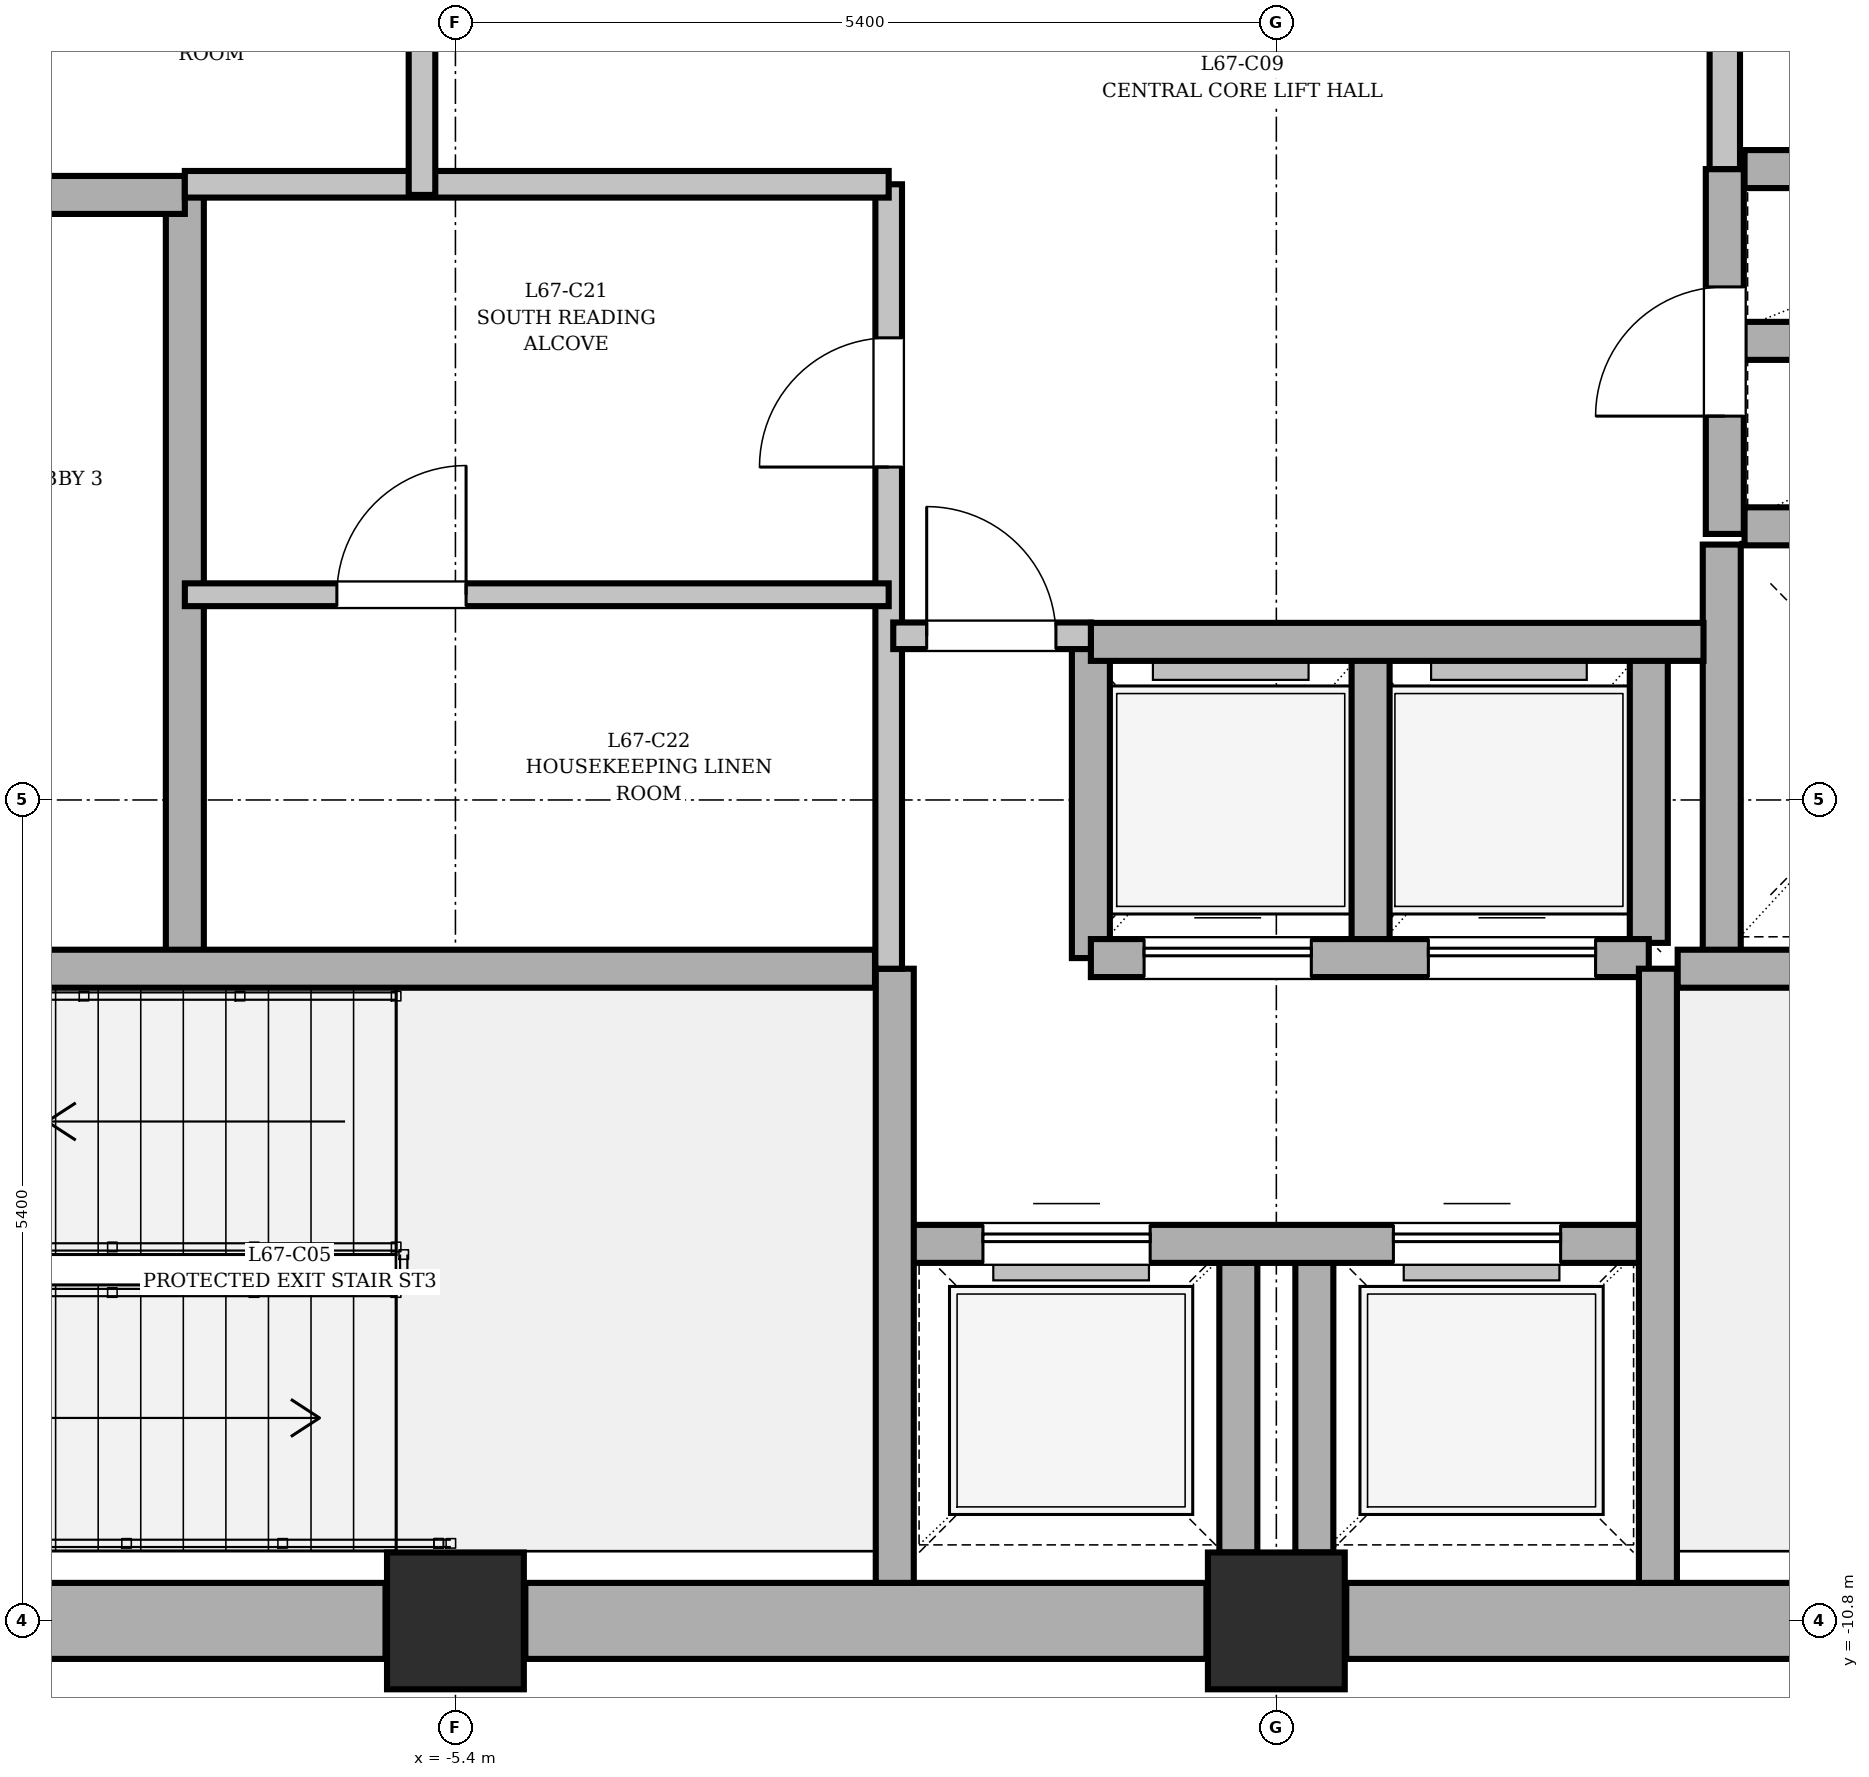
"""IFC4 building model, lengths in metres.
Left out: names, types, materials, properties, quantities, classifications, styles, units other than length and angle.
Written with IfcOpenShell. Run it as: python <this file> out.ifc"""

import sys

from ifc_helpers import new_model, si_unit, direction, frame, frame_2d, origin, origin_2d, place, context, subcontext, project, spatial, rectangle, extrude, element, fill, save


model = new_model("IFC4")
c1 = context("Model", 3, precision=1e-05, world=origin(), true_north=direction((0.0, 1.0)))
c2 = subcontext(c1, "Body", "Model", "MODEL_VIEW")
j1 = project(units=[si_unit("LENGTHUNIT", "METRE"), si_unit("PLANEANGLEUNIT", "RADIAN")], contexts=[c1])
p1 = place(None, origin())
s1 = spatial("IfcSite", under=j1, at=p1, CompositionType="ELEMENT")
p2 = place(p1, origin())
s2 = spatial("IfcBuilding", under=s1, at=p2, CompositionType="ELEMENT")
p3 = place(p2, frame((0.0, 0.0, 258.75)))
s3 = spatial("IfcBuildingStorey", under=s2, at=p3, CompositionType="ELEMENT", Elevation=258.75)
for number, where, z_axis, x_axis in (
    (1, (-5.4, -10.8, 0.0), (0.0, 0.0, 1.0), (1.0, 0.0, 0.0)),
    (2, (0.0, -10.8, 0.0), (0.0, 0.0, 1.0), (1.0, 0.0, 0.0)),
):
    element("IfcColumn", number, at=place(p3, frame(where, z_axis=z_axis, x_axis=x_axis)), inside=s3, PredefinedType="COLUMN", context=c2, shape_type="SweptSolid", body=[
        extrude(rectangle(XDim=0.9, YDim=0.9, at=origin_2d()), origin(), (0.0, 0.0, 1.0), 3.75),
    ])
for number, where, z_axis, x_axis in (
    (3, (-10.34, -10.8, 0.0), (0.0, 0.0, 1.0), (1.0, 0.0, 0.0)),
    (4, (-4.94, -10.8, 0.0), (0.0, 0.0, 1.0), (1.0, 0.0, 0.0)),
    (5, (0.46, -10.8, 0.0), (0.0, 0.0, 1.0), (1.0, 0.0, 0.0)),
):
    element("IfcWall", number, at=place(p3, frame(where, z_axis=z_axis, x_axis=x_axis)), inside=s3, PredefinedType="SHEAR", context=c2, shape_type="SweptSolid", body=[
        extrude(rectangle(XDim=4.48, YDim=0.5, at=frame_2d((2.24, 0.0))), origin(), (0.0, 0.0, 1.0), 3.75),
    ])
p4 = place(p3, frame((2.93, -6.51, 0.0), z_axis=(0.0, 0.0, 1.0), x_axis=(0.0, 1.0, 0.0)))
e6 = element("IfcWall", 6, at=p4, inside=s3, PredefinedType="SHEAR", context=c2, shape_type="SweptSolid", body=[
    extrude(rectangle(XDim=2.79, YDim=0.25, at=frame_2d((1.395, 0.0))), origin(), (0.0, 0.0, 1.0), 3.75),
])
p5 = place(p3, frame((3.08, -3.6, 0.0), z_axis=(0.0, 0.0, 1.0), x_axis=(1.0, 0.0, 0.0)))
e7 = element("IfcWall", 7, at=p5, inside=s3, PredefinedType="SHEAR", context=c2, shape_type="SweptSolid", body=[
    extrude(rectangle(XDim=2.37, YDim=0.25, at=frame_2d((1.185, 0.0))), origin(), (0.0, 0.0, 1.0), 3.75),
])
for number, where, z_axis, x_axis in (
    (8, (0.62, -6.34, 0.0), (0.0, 0.0, 1.0), (0.0, 1.0, 0.0)),
    (9, (2.45, -6.34, 0.0), (0.0, 0.0, 1.0), (0.0, 1.0, 0.0)),
):
    element("IfcWall", number, at=place(p3, frame(where, z_axis=z_axis, x_axis=x_axis)), inside=s3, PredefinedType="SHEAR", context=c2, shape_type="SweptSolid", body=[
        extrude(rectangle(XDim=1.88, YDim=0.25, at=frame_2d((0.94, 0.0))), origin(), (0.0, 0.0, 1.0), 3.75),
    ])
for number, where, z_axis, x_axis in (
    (10, (-0.25, -10.35, 0.0), (0.0, 0.0, 1.0), (0.0, 1.0, 0.0)),
    (11, (0.25, -10.35, 0.0), (0.0, 0.0, 1.0), (0.0, 1.0, 0.0)),
):
    element("IfcWall", number, at=place(p3, frame(where, z_axis=z_axis, x_axis=x_axis)), inside=s3, PredefinedType="SHEAR", context=c2, shape_type="SweptSolid", body=[
        extrude(rectangle(XDim=1.91, YDim=0.25, at=frame_2d((0.955, 0.0))), origin(), (0.0, 0.0, 1.0), 3.75),
    ])
p6 = place(p3, frame((-1.22, -6.44, 0.0), z_axis=(0.0, 0.0, 1.0), x_axis=(0.0, 1.0, 0.0)))
e12 = element("IfcWall", 12, at=p6, inside=s3, PredefinedType="SHEAR", context=c2, shape_type="SweptSolid", body=[
    extrude(rectangle(XDim=2.08, YDim=0.25, at=frame_2d((1.04, 0.0))), origin(), (0.0, 0.0, 1.0), 3.75),
])
p7 = place(p3, frame((-1.22, -6.44, 0.0), z_axis=(0.0, 0.0, 1.0), x_axis=(1.0, 0.0, 0.0)))
e13 = element("IfcWall", 13, at=p7, inside=s3, PredefinedType="SHEAR", context=c2, shape_type="SweptSolid", body=[
    extrude(rectangle(XDim=3.67, YDim=0.25, at=frame_2d((1.835, 0.0))), origin(), (0.0, 0.0, 1.0), 3.75),
])
p8 = place(p7, frame((0.35, 0.0, 0.0)))
e14 = element("IfcOpeningElement", 14, at=p8, cuts=e13, PredefinedType="OPENING", context=c2, shape_type="SweptSolid", body=[
    extrude(rectangle(XDim=1.1, YDim=2.1, at=frame_2d((0.55, 1.05))), frame((0.0, 0.135, 0.0), z_axis=(0.0, -1.0, 0.0), x_axis=(1.0, 0.0, 0.0)), (0.0, 0.0, 1.0), 0.27),
])
p9 = place(p7, frame((2.22, 0.0, 0.0)))
e15 = element("IfcOpeningElement", 15, at=p9, cuts=e13, PredefinedType="OPENING", context=c2, shape_type="SweptSolid", body=[
    extrude(rectangle(XDim=1.1, YDim=2.1, at=frame_2d((0.55, 1.05))), frame((0.0, 0.135, 0.0), z_axis=(0.0, -1.0, 0.0), x_axis=(1.0, 0.0, 0.0)), (0.0, 0.0, 1.0), 0.27),
])
p10 = place(p3, frame((-2.48, -8.32, 0.0), z_axis=(0.0, 0.0, 1.0), x_axis=(1.0, 0.0, 0.0)))
e16 = element("IfcWall", 16, at=p10, inside=s3, PredefinedType="SHEAR", context=c2, shape_type="SweptSolid", body=[
    extrude(rectangle(XDim=4.93, YDim=0.25, at=frame_2d((2.465, 0.0))), origin(), (0.0, 0.0, 1.0), 3.75),
])
p11 = place(p10, frame((0.55, 0.0, 0.0)))
e17 = element("IfcOpeningElement", 17, at=p11, cuts=e16, PredefinedType="OPENING", context=c2, shape_type="SweptSolid", body=[
    extrude(rectangle(XDim=1.1, YDim=2.1, at=frame_2d((0.55, 1.05))), frame((0.0, 0.135, 0.0), z_axis=(0.0, -1.0, 0.0), x_axis=(1.0, 0.0, 0.0)), (0.0, 0.0, 1.0), 0.27),
])
p12 = place(p10, frame((3.25, 0.0, 0.0)))
e18 = element("IfcOpeningElement", 18, at=p12, cuts=e16, PredefinedType="OPENING", context=c2, shape_type="SweptSolid", body=[
    extrude(rectangle(XDim=1.1, YDim=2.1, at=frame_2d((0.55, 1.05))), frame((0.0, 0.135, 0.0), z_axis=(0.0, -1.0, 0.0), x_axis=(1.0, 0.0, 0.0)), (0.0, 0.0, 1.0), 0.27),
])
p13 = place(p3, frame((-1.22, -4.36, 0.0), z_axis=(0.0, 0.0, 1.0), x_axis=(1.0, 0.0, 0.0)))
e19 = element("IfcWall", 19, at=p13, inside=s3, PredefinedType="SHEAR", context=c2, shape_type="SweptSolid", body=[
    extrude(rectangle(XDim=4.03, YDim=0.25, at=frame_2d((2.015, 0.0))), origin(), (0.0, 0.0, 1.0), 3.75),
])
for number, where, z_axis, x_axis in (
    (20, (3.08, -2.38, 0.0), (0.0, 0.0, 1.0), (1.0, 0.0, 0.0)),
    (21, (3.08, -1.25, 0.0), (0.0, 0.0, 1.0), (1.0, 0.0, 0.0)),
):
    element("IfcWall", number, at=place(p3, frame(where, z_axis=z_axis, x_axis=x_axis)), inside=s3, PredefinedType="SHEAR", context=c2, shape_type="SweptSolid", body=[
        extrude(rectangle(XDim=2.37, YDim=0.25, at=frame_2d((1.185, 0.0))), origin(), (0.0, 0.0, 1.0), 3.75),
    ])
p14 = place(p3, frame((2.95, -3.65, 0.0), z_axis=(0.0, 0.0, 1.0), x_axis=(0.0, 1.0, 0.0)))
e22 = element("IfcWall", 22, at=p14, inside=s3, PredefinedType="SHEAR", context=c2, shape_type="SweptSolid", body=[
    extrude(rectangle(XDim=2.4, YDim=0.25, at=frame_2d((1.2, 0.0))), origin(), (0.0, 0.0, 1.0), 3.75),
])
p15 = place(p14, frame((0.775, 0.0, 0.0)))
e23 = element("IfcOpeningElement", 23, at=p15, cuts=e22, PredefinedType="OPENING", context=c2, shape_type="SweptSolid", body=[
    extrude(rectangle(XDim=0.85, YDim=2.1, at=frame_2d((0.425, 1.05))), frame((0.0, 0.135, 0.0), z_axis=(0.0, -1.0, 0.0), x_axis=(1.0, 0.0, 0.0)), (0.0, 0.0, 1.0), 0.27),
])
p16 = place(p3, frame((2.64, -6.51, 0.0), z_axis=(0.0, 0.0, 1.0), x_axis=(1.0, 0.0, 0.0)))
e24 = element("IfcWall", 24, at=p16, inside=s3, PredefinedType="SHEAR", context=c2, shape_type="SweptSolid", body=[
    extrude(rectangle(XDim=7.7, YDim=0.25, at=frame_2d((3.85, 0.0))), origin(), (0.0, 0.0, 1.0), 3.75),
])
p17 = place(p16, frame((6.0, 0.0, 0.0)))
e25 = element("IfcOpeningElement", 25, at=p17, cuts=e24, PredefinedType="OPENING", context=c2, shape_type="SweptSolid", body=[
    extrude(rectangle(XDim=0.95, YDim=2.1, at=frame_2d((0.475, 1.05))), frame((0.0, 0.135, 0.0), z_axis=(0.0, -1.0, 0.0), x_axis=(1.0, 0.0, 0.0)), (0.0, 0.0, 1.0), 0.27),
])
for number, where, z_axis, x_axis in (
    (26, (2.51, -10.55, 0.0), (0.0, 0.0, 1.0), (0.0, 1.0, 0.0)),
    (27, (-2.51, -10.55, 0.0), (0.0, 0.0, 1.0), (0.0, 1.0, 0.0)),
):
    element("IfcWall", number, at=place(p3, frame(where, z_axis=z_axis, x_axis=x_axis)), inside=s3, PredefinedType="SHEAR", context=c2, shape_type="SweptSolid", body=[
        extrude(rectangle(XDim=4.04, YDim=0.25, at=frame_2d((2.02, 0.0))), origin(), (0.0, 0.0, 1.0), 3.75),
    ])
p18 = place(p3, frame((-7.18, -6.51, 0.0), z_axis=(0.0, 0.0, 1.0), x_axis=(0.0, 1.0, 0.0)))
e28 = element("IfcWall", 28, at=p18, inside=s3, PredefinedType="SHEAR", context=c2, shape_type="SweptSolid", body=[
    extrude(rectangle(XDim=5.09, YDim=0.25, at=frame_2d((2.545, 0.0))), origin(), (0.0, 0.0, 1.0), 3.75),
])
p19 = place(p3, frame((-10.34, -1.42, 0.0), z_axis=(0.0, 0.0, 1.0), x_axis=(1.0, 0.0, 0.0)))
e29 = element("IfcWall", 29, at=p19, inside=s3, PredefinedType="SHEAR", context=c2, shape_type="SweptSolid", body=[
    extrude(rectangle(XDim=3.16, YDim=0.25, at=frame_2d((1.58, 0.0))), origin(), (0.0, 0.0, 1.0), 3.75),
])
p20 = place(p3, frame((-10.34, -6.51, 0.0), z_axis=(0.0, 0.0, 1.0), x_axis=(1.0, 0.0, 0.0)))
e30 = element("IfcWall", 30, at=p20, inside=s3, PredefinedType="SHEAR", context=c2, shape_type="SweptSolid", body=[
    extrude(rectangle(XDim=7.7, YDim=0.25, at=frame_2d((3.85, 0.0))), origin(), (0.0, 0.0, 1.0), 3.75),
])
p21 = place(p20, frame((0.35, 0.0, 0.0)))
e31 = element("IfcOpeningElement", 31, at=p21, cuts=e30, PredefinedType="OPENING", context=c2, shape_type="SweptSolid", body=[
    extrude(rectangle(XDim=1.1, YDim=2.1, at=frame_2d((0.55, 1.05))), frame((0.0, 0.135, 0.0), z_axis=(0.0, -1.0, 0.0), x_axis=(1.0, 0.0, 0.0)), (0.0, 0.0, 1.0), 0.27),
])
p22 = place(p3, frame((-2.55, -6.51, 0.0), z_axis=(0.0, 0.0, 1.0), x_axis=(0.0, 1.0, 0.0)))
e32 = element("IfcWall", 32, at=p22, inside=s3, PredefinedType="PARTITIONING", context=c2, shape_type="SweptSolid", body=[
    extrude(rectangle(XDim=5.16, YDim=0.175, at=frame_2d((2.58, 0.0))), origin(), (0.0, 0.0, 1.0), 3.57),
])
p23 = place(p22, frame((3.3, 0.0, 0.0)))
e33 = element("IfcOpeningElement", 33, at=p23, cuts=e32, PredefinedType="OPENING", context=c2, shape_type="SweptSolid", body=[
    extrude(rectangle(XDim=0.85, YDim=2.1, at=frame_2d((0.425, 1.05))), frame((0.0, 0.097, 0.0), z_axis=(0.0, -1.0, 0.0), x_axis=(1.0, 0.0, 0.0)), (0.0, 0.0, 1.0), 0.195),
])
p24 = place(p3, frame((-7.18, -4.05, 0.0), z_axis=(0.0, 0.0, 1.0), x_axis=(1.0, 0.0, 0.0)))
e34 = element("IfcWall", 34, at=p24, inside=s3, PredefinedType="PARTITIONING", context=c2, shape_type="SweptSolid", body=[
    extrude(rectangle(XDim=4.63, YDim=0.15, at=frame_2d((2.315, 0.0))), origin(), (0.0, 0.0, 1.0), 3.57),
])
p25 = place(p24, frame((1.0, 0.0, 0.0)))
e35 = element("IfcOpeningElement", 35, at=p25, cuts=e34, PredefinedType="OPENING", context=c2, shape_type="SweptSolid", body=[
    extrude(rectangle(XDim=0.85, YDim=2.1, at=frame_2d((0.425, 1.05))), frame((0.0, 0.085, 0.0), z_axis=(0.0, -1.0, 0.0), x_axis=(1.0, 0.0, 0.0)), (0.0, 0.0, 1.0), 0.17),
])
p26 = place(p3, frame((-7.18, -1.35, 0.0), z_axis=(0.0, 0.0, 1.0), x_axis=(1.0, 0.0, 0.0)))
e36 = element("IfcWall", 36, at=p26, inside=s3, PredefinedType="PARTITIONING", context=c2, shape_type="SweptSolid", body=[
    extrude(rectangle(XDim=4.63, YDim=0.175, at=frame_2d((2.315, 0.0))), origin(), (0.0, 0.0, 1.0), 3.57),
])
p27 = place(p3, frame((-5.62, -1.42, 0.0), z_axis=(0.0, 0.0, 1.0), x_axis=(0.0, 1.0, 0.0)))
e37 = element("IfcWall", 37, at=p27, inside=s3, PredefinedType="PARTITIONING", context=c2, shape_type="SweptSolid", body=[
    extrude(rectangle(XDim=2.14, YDim=0.175, at=frame_2d((1.07, 0.0))), origin(), (0.0, 0.0, 1.0), 3.57),
])
p28 = place(p3, frame((-2.52, -4.32, 0.0), z_axis=(0.0, 0.0, 1.0), x_axis=(1.0, 0.0, 0.0)))
e38 = element("IfcWall", 38, at=p28, inside=s3, PredefinedType="PARTITIONING", context=c2, shape_type="SweptSolid", body=[
    extrude(rectangle(XDim=1.3, YDim=0.175, at=frame_2d((0.65, 0.0))), origin(), (0.0, 0.0, 1.0), 3.57),
])
p29 = place(p28, frame((0.22, 0.0, 0.0)))
e39 = element("IfcOpeningElement", 39, at=p29, cuts=e38, PredefinedType="OPENING", context=c2, shape_type="SweptSolid", body=[
    extrude(rectangle(XDim=0.85, YDim=2.1, at=frame_2d((0.425, 1.05))), frame((0.0, 0.097, 0.0), z_axis=(0.0, -1.0, 0.0), x_axis=(1.0, 0.0, 0.0)), (0.0, 0.0, 1.0), 0.195),
])
p30 = place(p3, frame((2.95, -1.25, 0.0), z_axis=(0.0, 0.0, 1.0), x_axis=(0.0, 1.0, 0.0)))
e40 = element("IfcWall", 40, at=p30, inside=s3, PredefinedType="PARTITIONING", context=c2, shape_type="SweptSolid", body=[
    extrude(rectangle(XDim=2.77, YDim=0.2, at=frame_2d((1.385, 0.0))), origin(), (0.0, 0.0, 1.0), 3.57),
])
p31 = place(p15, origin())
e41 = element("IfcDoor", 41, at=p31, inside=s3, OperationType="SINGLE_SWING_LEFT", PredefinedType="DOOR", context=c2, shape_type="SweptSolid", body=[
    extrude(rectangle(XDim=0.85, YDim=2.1, at=frame_2d((0.425, 1.05))), frame((0.0, 0.025, 0.0), z_axis=(0.0, -1.0, 0.0), x_axis=(1.0, 0.0, 0.0)), (0.0, 0.0, 1.0), 0.05),
])
fill(e23, e41)
p32 = place(p29, origin())
e42 = element("IfcDoor", 42, at=p32, inside=s3, OperationType="SINGLE_SWING_LEFT", PredefinedType="DOOR", context=c2, shape_type="SweptSolid", body=[
    extrude(rectangle(XDim=0.85, YDim=2.1, at=frame_2d((0.425, 1.05))), frame((0.0, 0.025, 0.0), z_axis=(0.0, -1.0, 0.0), x_axis=(1.0, 0.0, 0.0)), (0.0, 0.0, 1.0), 0.05),
])
fill(e39, e42)
p33 = place(p8, origin())
e43 = element("IfcDoor", 43, at=p33, inside=s3, OperationType="SLIDING_TO_LEFT", PredefinedType="DOOR", context=c2, shape_type="SweptSolid", body=[
    extrude(rectangle(XDim=1.1, YDim=2.1, at=frame_2d((0.55, 1.05))), frame((0.0, 0.025, 0.0), z_axis=(0.0, -1.0, 0.0), x_axis=(1.0, 0.0, 0.0)), (0.0, 0.0, 1.0), 0.05),
])
fill(e14, e43)
p34 = place(p9, origin())
e44 = element("IfcDoor", 44, at=p34, inside=s3, OperationType="SLIDING_TO_LEFT", PredefinedType="DOOR", context=c2, shape_type="SweptSolid", body=[
    extrude(rectangle(XDim=1.1, YDim=2.1, at=frame_2d((0.55, 1.05))), frame((0.0, 0.025, 0.0), z_axis=(0.0, -1.0, 0.0), x_axis=(1.0, 0.0, 0.0)), (0.0, 0.0, 1.0), 0.05),
])
fill(e15, e44)
p35 = place(p11, origin())
e45 = element("IfcDoor", 45, at=p35, inside=s3, OperationType="SLIDING_TO_LEFT", PredefinedType="DOOR", context=c2, shape_type="SweptSolid", body=[
    extrude(rectangle(XDim=1.1, YDim=2.1, at=frame_2d((0.55, 1.05))), frame((0.0, 0.025, 0.0), z_axis=(0.0, -1.0, 0.0), x_axis=(1.0, 0.0, 0.0)), (0.0, 0.0, 1.0), 0.05),
])
fill(e17, e45)
p36 = place(p12, origin())
e46 = element("IfcDoor", 46, at=p36, inside=s3, OperationType="SLIDING_TO_LEFT", PredefinedType="DOOR", context=c2, shape_type="SweptSolid", body=[
    extrude(rectangle(XDim=1.1, YDim=2.1, at=frame_2d((0.55, 1.05))), frame((0.0, 0.025, 0.0), z_axis=(0.0, -1.0, 0.0), x_axis=(1.0, 0.0, 0.0)), (0.0, 0.0, 1.0), 0.05),
])
fill(e18, e46)
p37 = place(p23, origin())
e47 = element("IfcDoor", 47, at=p37, inside=s3, OperationType="SINGLE_SWING_LEFT", PredefinedType="DOOR", context=c2, shape_type="SweptSolid", body=[
    extrude(rectangle(XDim=0.85, YDim=2.1, at=frame_2d((0.425, 1.05))), frame((0.0, 0.025, 0.0), z_axis=(0.0, -1.0, 0.0), x_axis=(1.0, 0.0, 0.0)), (0.0, 0.0, 1.0), 0.05),
])
fill(e33, e47)
p38 = place(p25, origin())
e48 = element("IfcDoor", 48, at=p38, inside=s3, OperationType="SINGLE_SWING_RIGHT", PredefinedType="DOOR", context=c2, shape_type="SweptSolid", body=[
    extrude(rectangle(XDim=0.85, YDim=2.1, at=frame_2d((0.425, 1.05))), frame((0.0, 0.025, 0.0), z_axis=(0.0, -1.0, 0.0), x_axis=(1.0, 0.0, 0.0)), (0.0, 0.0, 1.0), 0.05),
])
fill(e35, e48)
save(model, sys.argv[1])
